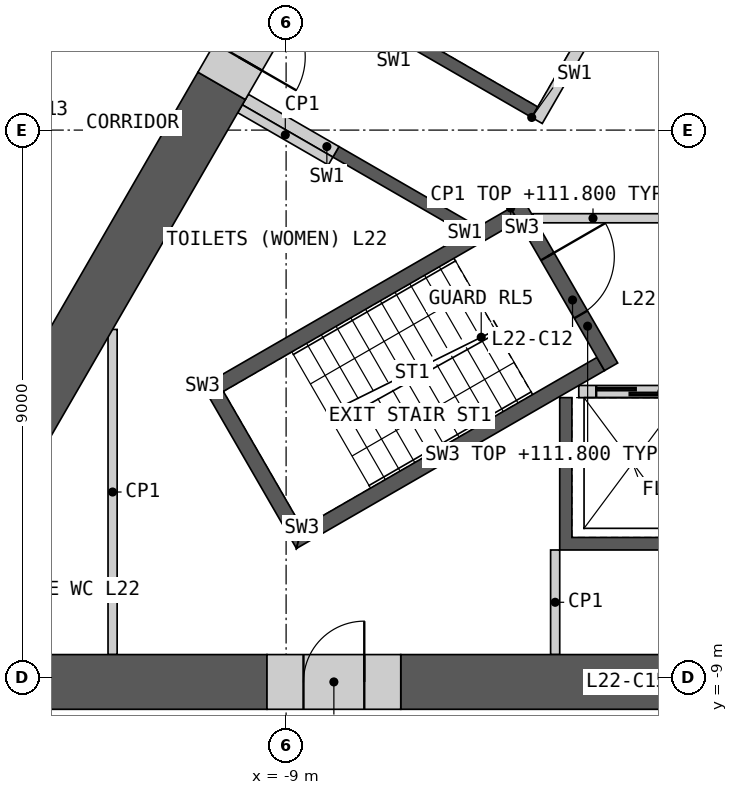
"""IFC4 building model, lengths in metres.
Left out: names, types, materials, properties, quantities, classifications, styles, units other than length and angle.
Written with IfcOpenShell. Run it as: python <this file> out.ifc"""

import sys

from ifc_helpers import new_model, si_unit, direction, frame, frame_2d, origin, place, context, subcontext, project, spatial, polyline, rectangle, outline, extrude, element, fill, save


model = new_model("IFC4")
c1 = context("Model", 3, precision=1e-05, world=origin(), true_north=direction((0.0, 1.0)))
c2 = subcontext(c1, "Body", "Model", "MODEL_VIEW")
j1 = project(units=[si_unit("LENGTHUNIT", "METRE"), si_unit("PLANEANGLEUNIT", "RADIAN")], contexts=[c1])
p1 = place(None, origin())
s1 = spatial("IfcSite", under=j1, at=p1, CompositionType="ELEMENT")
p2 = place(p1, origin())
s2 = spatial("IfcBuilding", under=s1, at=p2, CompositionType="ELEMENT")
p3 = place(p2, frame((0.0, 0.0, 108.0)))
s3 = spatial("IfcBuildingStorey", under=s2, at=p3, CompositionType="ELEMENT", Elevation=108.0)
p4 = place(p3, origin())
e1 = element("IfcWall", 1, at=p4, inside=s3, PredefinedType="SHEAR", context=c2, shape_type="SweptSolid", body=[
    extrude(outline(polyline([(4.5, -4.4), (4.5, -6.906), (-4.5, -6.906), (-4.5, -4.4), (-4.3, -4.4), (-4.3, -6.7), (-2.3, -6.7), (-2.3, -4.4), (-2.1, -4.4), (-2.1, -6.7), (-0.1, -6.7), (-0.1, -4.4), (0.1, -4.4), (0.1, -6.7), (2.1, -6.7), (2.1, -4.4), (2.3, -4.4), (2.3, -6.7), (4.3, -6.7), (4.3, -4.4), (4.5, -4.4)])), origin(), (0.0, 0.0, 1.0), 3.8),
])
p5 = place(p3, frame((-4.187, -4.3, 0.0), z_axis=(0.0, 0.0, 1.0), x_axis=(1.0, 0.0, 0.0)))
e2 = element("IfcWall", 2, at=p5, inside=s3, PredefinedType="SOLIDWALL", context=c2, shape_type="SweptSolid", body=[
    extrude(rectangle(XDim=8.373, YDim=0.2, at=frame_2d((4.187, 0.0))), origin(), (0.0, 0.0, 1.0), 3.8),
])
p6 = place(p5, frame((0.287, 0.0, 0.0)))
e3 = element("IfcOpeningElement", 3, at=p6, cuts=e2, PredefinedType="OPENING", context=c2, shape_type="SweptSolid", body=[
    extrude(rectangle(XDim=1.2, YDim=2.1, at=frame_2d((0.6, 1.05))), frame((0.0, 0.11, 0.0), z_axis=(0.0, -1.0, 0.0), x_axis=(1.0, 0.0, 0.0)), (0.0, 0.0, 1.0), 0.22),
])
p7 = place(p5, frame((2.387, 0.0, 0.0)))
e4 = element("IfcOpeningElement", 4, at=p7, cuts=e2, PredefinedType="OPENING", context=c2, shape_type="SweptSolid", body=[
    extrude(rectangle(XDim=1.4, YDim=2.1, at=frame_2d((0.7, 1.05))), frame((0.0, 0.11, 0.0), z_axis=(0.0, -1.0, 0.0), x_axis=(1.0, 0.0, 0.0)), (0.0, 0.0, 1.0), 0.22),
])
p8 = place(p5, frame((4.737, 0.0, 0.0)))
e5 = element("IfcOpeningElement", 5, at=p8, cuts=e2, PredefinedType="OPENING", context=c2, shape_type="SweptSolid", body=[
    extrude(rectangle(XDim=1.1, YDim=2.1, at=frame_2d((0.55, 1.05))), frame((0.0, 0.11, 0.0), z_axis=(0.0, -1.0, 0.0), x_axis=(1.0, 0.0, 0.0)), (0.0, 0.0, 1.0), 0.22),
])
p9 = place(p5, frame((6.887, 0.0, 0.0)))
e6 = element("IfcOpeningElement", 6, at=p9, cuts=e2, PredefinedType="OPENING", context=c2, shape_type="SweptSolid", body=[
    extrude(rectangle(XDim=1.2, YDim=2.1, at=frame_2d((0.6, 1.05))), frame((0.0, 0.11, 0.0), z_axis=(0.0, -1.0, 0.0), x_axis=(1.0, 0.0, 0.0)), (0.0, 0.0, 1.0), 0.22),
])
p10 = place(p3, origin())
e7 = element("IfcWall", 7, at=p10, inside=s3, PredefinedType="SHEAR", context=c2, shape_type="SweptSolid", body=[
    extrude(outline(polyline([(-6.061, -1.697), (-8.231, -0.444), (-8.131, -0.271), (-5.96, -1.524), (-6.061, -1.697)])), origin(), (0.0, 0.0, 1.0), 3.8),
])
p11 = place(p3, origin())
e8 = element("IfcWall", 8, at=p11, inside=s3, PredefinedType="SHEAR", context=c2, shape_type="SweptSolid", body=[
    extrude(outline(polyline([(-4.96, 0.208), (-7.131, 1.461), (-5.931, 3.54), (-3.76, 2.287), (-3.861, 2.113), (-5.852, 3.263), (-6.852, 1.531), (-4.861, 0.381), (-4.96, 0.208)])), origin(), (0.0, 0.0, 1.0), 3.8),
])
p12 = place(p3, frame((-1.631, 5.776, 0.0), z_axis=(0.0, 0.0, 1.0), x_axis=(-0.499992876559, -0.866029516466, 0.0)))
e9 = element("IfcWall", 9, at=p12, inside=s3, PredefinedType="SOLIDWALL", context=c2, shape_type="SweptSolid", body=[
    extrude(rectangle(XDim=6.486, YDim=0.2, at=frame_2d((3.243, 0.0))), origin(), (0.0, 0.0, 1.0), 3.8),
])
p13 = place(p12, frame((0.437, 0.0, 0.0)))
e10 = element("IfcOpeningElement", 10, at=p13, cuts=e9, PredefinedType="OPENING", context=c2, shape_type="SweptSolid", body=[
    extrude(rectangle(XDim=0.9, YDim=2.1, at=frame_2d((0.45, 1.05))), frame((0.0, 0.11, 0.0), z_axis=(0.0, -1.0, 0.0), x_axis=(1.0, 0.0, 0.0)), (0.0, 0.0, 1.0), 0.22),
])
p14 = place(p12, frame((2.637, 0.0, 0.0)))
e11 = element("IfcOpeningElement", 11, at=p14, cuts=e9, PredefinedType="OPENING", context=c2, shape_type="SweptSolid", body=[
    extrude(rectangle(XDim=0.9, YDim=2.1, at=frame_2d((0.45, 1.05))), frame((0.0, 0.11, 0.0), z_axis=(0.0, -1.0, 0.0), x_axis=(1.0, 0.0, 0.0)), (0.0, 0.0, 1.0), 0.22),
])
p15 = place(p3, frame((-8.181, -0.357, 0.0), z_axis=(0.0, 0.0, 1.0), x_axis=(-0.866024871741, 0.500000921525, 0.0)))
e12 = element("IfcWall", 12, at=p15, inside=s3, PredefinedType="SHEAR", context=c2, shape_type="SweptSolid", body=[
    extrude(rectangle(XDim=1.72, YDim=0.2, at=frame_2d((0.86, 0.0))), origin(), (0.0, 0.0, 1.0), 3.8),
])
p16 = place(p3, frame((-4.941, -1.45, 0.0), z_axis=(0.0, 0.0, 1.0), x_axis=(1.0, 0.0, 0.0)))
e13 = element("IfcWall", 13, at=p16, inside=s3, PredefinedType="PARTITIONING", context=c2, shape_type="SweptSolid", body=[
    extrude(rectangle(XDim=9.882, YDim=0.15, at=frame_2d((4.941, 0.0))), origin(), (0.0, 0.0, 1.0), 3.8),
])
p17 = place(p16, frame((4.391, 0.0, 0.0)))
e14 = element("IfcOpeningElement", 14, at=p17, cuts=e13, PredefinedType="OPENING", context=c2, shape_type="SweptSolid", body=[
    extrude(rectangle(XDim=1.1, YDim=2.1, at=frame_2d((0.55, 1.05))), frame((0.0, 0.085, 0.0), z_axis=(0.0, -1.0, 0.0), x_axis=(1.0, 0.0, 0.0)), (0.0, 0.0, 1.0), 0.17),
])
p18 = place(p3, origin())
e15 = element("IfcWall", 15, at=p18, inside=s3, PredefinedType="SHEAR", context=c2, shape_type="SweptSolid", body=[
    extrude(outline(polyline([(-5.307, -1.281), (-10.374, -4.206), (-10.032, -4.298), (-5.182, -1.498), (-5.307, -1.281)])), origin(), (0.0, 0.0, 1.0), 3.8),
])
p19 = place(p3, origin())
e16 = element("IfcWall", 16, at=p19, inside=s3, PredefinedType="SHEAR", context=c2, shape_type="SweptSolid", body=[
    extrude(outline(polyline([(-10.374, -4.206), (-8.83, -6.881), (-8.738, -6.539), (-10.032, -4.298), (-10.374, -4.206)])), origin(), (0.0, 0.0, 1.0), 3.8),
])
p20 = place(p3, origin())
e17 = element("IfcWall", 17, at=p20, inside=s3, PredefinedType="SHEAR", context=c2, shape_type="SweptSolid", body=[
    extrude(outline(polyline([(-8.738, -6.539), (-8.83, -6.881), (-3.763, -3.956), (-3.888, -3.739), (-8.738, -6.539)])), origin(), (0.0, 0.0, 1.0), 3.8),
])
p21 = place(p3, frame((-5.199, -1.219, 0.0), z_axis=(0.0, 0.0, 1.0), x_axis=(0.499982516597, -0.866035497597, 0.0)))
e18 = element("IfcWall", 18, at=p21, inside=s3, PredefinedType="SHEAR", context=c2, shape_type="SweptSolid", body=[
    extrude(rectangle(XDim=3.088, YDim=0.25, at=frame_2d((1.544, 0.0))), origin(), (0.0, 0.0, 1.0), 3.8),
])
p22 = place(p21, frame((0.994, 0.0, 0.0)))
e19 = element("IfcOpeningElement", 19, at=p22, cuts=e18, PredefinedType="OPENING", context=c2, shape_type="SweptSolid", body=[
    extrude(rectangle(XDim=1.1, YDim=2.1, at=frame_2d((0.55, 1.05))), frame((0.0, 0.135, 0.0), z_axis=(0.0, -1.0, 0.0), x_axis=(1.0, 0.0, 0.0)), (0.0, 0.0, 1.0), 0.27),
])
for number, where, z_axis, x_axis in (
    (20, (-8.268, -0.509, 0.0), (0.0, 0.0, 1.0), (-0.866, 0.5, 0.0)),
    (21, (-4.575, -6.906, 0.0), (0.0, 0.0, 1.0), (0.0, -1.0, 0.0)),
):
    element("IfcWall", number, at=place(p3, frame(where, z_axis=z_axis, x_axis=x_axis)), inside=s3, PredefinedType="PARTITIONING", context=c2, shape_type="SweptSolid", body=[
        extrude(rectangle(XDim=1.72, YDim=0.15, at=frame_2d((0.86, 0.0))), origin(), (0.0, 0.0, 1.0), 3.8),
    ])
p23 = place(p3, frame((-11.854, -8.626, 0.0), z_axis=(0.0, 0.0, 1.0), x_axis=(0.0, 1.0, 0.0)))
e22 = element("IfcWall", 22, at=p23, inside=s3, PredefinedType="PARTITIONING", context=c2, shape_type="SweptSolid", body=[
    extrude(rectangle(XDim=5.347, YDim=0.15, at=frame_2d((2.674, 0.0))), origin(), (0.0, 0.0, 1.0), 3.8),
])
p24 = place(p3, frame((-14.941, -9.076, 0.0), z_axis=(0.0, 0.0, 1.0), x_axis=(1.0, 0.0, 0.0)))
e23 = element("IfcWall", 23, at=p24, inside=s3, PredefinedType="SHEAR", context=c2, shape_type="SweptSolid", body=[
    extrude(rectangle(XDim=5.627, YDim=0.9, at=frame_2d((2.813, 0.0))), origin(), (0.0, 0.0, 1.0), 3.8),
])
p25 = place(p3, frame((-7.115, -9.076, 0.0), z_axis=(0.0, 0.0, 1.0), x_axis=(1.0, 0.0, 0.0)))
e24 = element("IfcWall", 24, at=p25, inside=s3, PredefinedType="SHEAR", context=c2, shape_type="SweptSolid", body=[
    extrude(rectangle(XDim=4.393, YDim=0.9, at=frame_2d((2.197, 0.0))), origin(), (0.0, 0.0, 1.0), 3.8),
])
p26 = place(p3, frame((-10.06, 0.728, 0.0), z_axis=(0.0, 0.0, 1.0), x_axis=(-0.500002975332, -0.866023685969, 0.0)))
e25 = element("IfcWall", 25, at=p26, inside=s3, PredefinedType="SHEAR", context=c2, shape_type="SweptSolid", body=[
    extrude(rectangle(XDim=6.429, YDim=0.9, at=frame_2d((3.214, 0.0))), origin(), (0.0, 0.0, 1.0), 3.8),
])
p27 = place(p3, frame((-9.314, -9.076, 0.0), z_axis=(0.0, 0.0, 1.0), x_axis=(1.0, 0.0, 0.0)))
e26 = element("IfcWall", 26, at=p27, inside=s3, PredefinedType="SHEAR", context=c2, shape_type="SweptSolid", body=[
    extrude(rectangle(XDim=2.2, YDim=0.9, at=frame_2d((1.1, 0.0))), origin(), (0.0, 0.0, 1.0), 3.8),
])
p28 = place(p27, frame((0.6, 0.0, 0.0)))
e27 = element("IfcOpeningElement", 27, at=p28, cuts=e26, PredefinedType="OPENING", context=c2, shape_type="SweptSolid", body=[
    extrude(rectangle(XDim=1.0, YDim=2.1, at=frame_2d((0.5, 1.05))), frame((0.0, 0.46, 0.0), z_axis=(0.0, -1.0, 0.0), x_axis=(1.0, 0.0, 0.0)), (0.0, 0.0, 1.0), 0.92),
])
p29 = place(p3, frame((-8.96, 2.633, 0.0), z_axis=(0.0, 0.0, 1.0), x_axis=(-0.50002983664, -0.866008176907, 0.0)))
e28 = element("IfcWall", 28, at=p29, inside=s3, PredefinedType="SHEAR", context=c2, shape_type="SweptSolid", body=[
    extrude(rectangle(XDim=2.2, YDim=0.9, at=frame_2d((1.1, 0.0))), origin(), (0.0, 0.0, 1.0), 3.8),
])
p30 = place(p29, frame((0.55, 0.0, 0.0)))
e29 = element("IfcOpeningElement", 29, at=p30, cuts=e28, PredefinedType="OPENING", context=c2, shape_type="SweptSolid", body=[
    extrude(rectangle(XDim=1.1, YDim=2.1, at=frame_2d((0.55, 1.05))), frame((0.0, 0.46, 0.0), z_axis=(0.0, -1.0, 0.0), x_axis=(1.0, 0.0, 0.0)), (0.0, 0.0, 1.0), 0.92),
])
p31 = place(p3, frame((-15.326, -2.693, 0.0), z_axis=(0.0, 0.0, 1.0), x_axis=(0.500010522431, 0.866019328571, 0.0)))
e30 = element("IfcWall", 30, at=p31, inside=s3, PredefinedType="PARTITIONING", context=c2, shape_type="SweptSolid", body=[
    extrude(rectangle(XDim=9.733, YDim=0.2, at=frame_2d((4.866, 0.0))), origin(), (0.0, 0.0, 1.0), 3.8),
])
p32 = place(p31, frame((3.966, 0.0, 0.0)))
e31 = element("IfcOpeningElement", 31, at=p32, cuts=e30, PredefinedType="OPENING", context=c2, shape_type="SweptSolid", body=[
    extrude(rectangle(XDim=1.8, YDim=2.1, at=frame_2d((0.9, 1.05))), frame((0.0, 0.11, 0.0), z_axis=(0.0, -1.0, 0.0), x_axis=(1.0, 0.0, 0.0)), (0.0, 0.0, 1.0), 0.22),
])
p33 = place(p6, origin())
e32 = element("IfcDoor", 32, at=p33, inside=s3, OperationType="SLIDING_TO_LEFT", PredefinedType="DOOR", context=c2, shape_type="SweptSolid", body=[
    extrude(rectangle(XDim=1.2, YDim=2.1, at=frame_2d((0.6, 1.05))), frame((0.0, 0.025, 0.0), z_axis=(0.0, -1.0, 0.0), x_axis=(1.0, 0.0, 0.0)), (0.0, 0.0, 1.0), 0.05),
])
fill(e3, e32)
p34 = place(p22, origin())
e33 = element("IfcDoor", 33, at=p34, inside=s3, OperationType="SINGLE_SWING_LEFT", PredefinedType="DOOR", context=c2, shape_type="SweptSolid", body=[
    extrude(rectangle(XDim=1.1, YDim=2.1, at=frame_2d((0.55, 1.05))), frame((0.0, 0.025, 0.0), z_axis=(0.0, -1.0, 0.0), x_axis=(1.0, 0.0, 0.0)), (0.0, 0.0, 1.0), 0.05),
])
fill(e19, e33)
p35 = place(p28, origin())
e34 = element("IfcDoor", 34, at=p35, inside=s3, OperationType="SINGLE_SWING_RIGHT", PredefinedType="DOOR", context=c2, shape_type="SweptSolid", body=[
    extrude(rectangle(XDim=1.0, YDim=2.1, at=frame_2d((0.5, 1.05))), frame((0.0, 0.205, 0.0), z_axis=(0.0, -1.0, 0.0), x_axis=(1.0, 0.0, 0.0)), (0.0, 0.0, 1.0), 0.05),
])
fill(e27, e34)
p36 = place(p30, origin())
e35 = element("IfcDoor", 35, at=p36, inside=s3, OperationType="SINGLE_SWING_RIGHT", PredefinedType="DOOR", context=c2, shape_type="SweptSolid", body=[
    extrude(rectangle(XDim=1.1, YDim=2.1, at=frame_2d((0.55, 1.05))), frame((0.0, 0.205, 0.0), z_axis=(0.0, -1.0, 0.0), x_axis=(1.0, 0.0, 0.0)), (0.0, 0.0, 1.0), 0.05),
])
fill(e29, e35)
p37 = place(p32, origin())
e36 = element("IfcDoor", 36, at=p37, inside=s3, OperationType="DOUBLE_DOOR_SINGLE_SWING", PredefinedType="DOOR", context=c2, shape_type="SweptSolid", body=[
    extrude(rectangle(XDim=1.8, YDim=2.1, at=frame_2d((0.9, 1.05))), frame((0.0, 0.025, 0.0), z_axis=(0.0, -1.0, 0.0), x_axis=(1.0, 0.0, 0.0)), (0.0, 0.0, 1.0), 0.05),
])
fill(e31, e36)
save(model, sys.argv[1])
